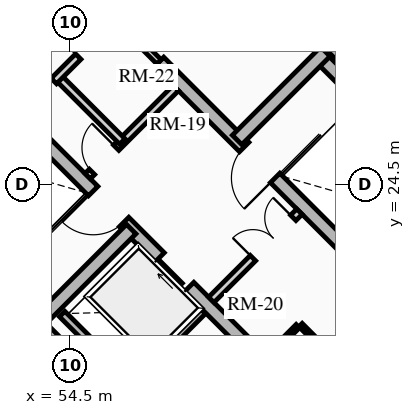
"""IFC4 building model, lengths in metres.
Left out: names, types, materials, properties, quantities, classifications, styles, units other than length and angle.
Written with IfcOpenShell. Run it as: python <this file> out.ifc"""

import sys

from ifc_helpers import new_model, si_unit, direction, frame, frame_2d, origin, place, context, subcontext, project, spatial, rectangle, extrude, source, transform, mapped, element, fill, save


model = new_model("IFC4")
c1 = context("Model", 3, precision=1e-05, world=origin(), true_north=direction((0.0, 1.0)))
c2 = subcontext(c1, "Body", "Model", "MODEL_VIEW")
j1 = project(units=[si_unit("LENGTHUNIT", "METRE"), si_unit("PLANEANGLEUNIT", "RADIAN")], contexts=[c1])
p1 = place(None, origin())
s1 = spatial("IfcSite", under=j1, at=p1, CompositionType="ELEMENT")
p2 = place(p1, origin())
s2 = spatial("IfcBuilding", under=s1, at=p2, CompositionType="ELEMENT")
p3 = place(p2, frame((0.0, 0.0, 240.33)))
s3 = spatial("IfcBuildingStorey", under=s2, at=p3, CompositionType="ELEMENT", Elevation=240.33)
for number, where, z_axis, x_axis in (
    (1, (58.702, 15.732, 0.0), (0.0, 0.0, 1.0), (-0.707, 0.707, 0.0)),
    (2, (66.268, 23.298, 0.0), (0.0, 0.0, 1.0), (-0.707, 0.707, 0.0)),
):
    element("IfcWall", number, at=place(p3, frame(where, z_axis=z_axis, x_axis=x_axis)), inside=s3, PredefinedType="SHEAR", context=c2, shape_type="SweptSolid", body=[
        extrude(rectangle(XDim=14.1, YDim=0.4, at=frame_2d((7.05, 0.0))), origin(), (0.0, 0.0, 1.0), 4.5),
    ])
p4 = place(p3, frame((58.561, 15.873, 0.0), z_axis=(0.0, 0.0, 1.0), x_axis=(0.707106781187, 0.707106781187, 0.0)))
e3 = element("IfcWall", 3, at=p4, inside=s3, PredefinedType="SHEAR", context=c2, shape_type="SweptSolid", body=[
    extrude(rectangle(XDim=10.7, YDim=0.4, at=frame_2d((5.35, 0.0))), origin(), (0.0, 0.0, 1.0), 4.5),
])
m1 = source(origin(), c2, "Body", "SweptSolid", [
    extrude(rectangle(XDim=1.5, YDim=2.02, at=frame_2d((0.75, 1.01))), frame((0.0, 0.21, 0.0), z_axis=(0.0, -1.0, 0.0), x_axis=(1.0, 0.0, 0.0)), (0.0, 0.0, 1.0), 0.42),
])
p5 = place(p4, frame((5.45, 0.0, 0.0)))
e4 = element("IfcOpeningElement", 4, at=p5, cuts=e3, PredefinedType="OPENING", context=c2, shape_type="MappedRepresentation", body=[
    mapped(m1, transform((0.0, 0.0, 0.0), x_axis=(1.0, 0.0, 0.0), y_axis=(0.0, 1.0, 0.0), z_axis=(0.0, 0.0, 1.0), scale=1.0)),
])
p6 = place(p3, frame((48.873, 25.561, 0.0), z_axis=(0.0, 0.0, 1.0), x_axis=(0.707106781187, 0.707106781187, 0.0)))
e5 = element("IfcWall", 5, at=p6, inside=s3, PredefinedType="SHEAR", context=c2, shape_type="SweptSolid", body=[
    extrude(rectangle(XDim=10.7, YDim=0.4, at=frame_2d((5.35, 0.0))), origin(), (0.0, 0.0, 1.0), 4.5),
])
p7 = place(p6, frame((4.6, 0.0, 0.0)))
e6 = element("IfcOpeningElement", 6, at=p7, cuts=e5, PredefinedType="OPENING", context=c2, shape_type="MappedRepresentation", body=[
    mapped(m1, transform((0.0, 0.0, 0.0), x_axis=(1.0, 0.0, 0.0), y_axis=(0.0, 1.0, 0.0), z_axis=(0.0, 0.0, 1.0), scale=1.0)),
])
p8 = place(p3, frame((61.06, 18.373, 0.0), z_axis=(0.0, 0.0, 1.0), x_axis=(-0.707106781187, 0.707106781187, 0.0)))
e7 = element("IfcWall", 7, at=p8, inside=s3, PredefinedType="SHEAR", context=c2, shape_type="SweptSolid", body=[
    extrude(rectangle(XDim=13.7, YDim=0.35, at=frame_2d((6.85, 0.0))), origin(), (0.0, 0.0, 1.0), 4.5),
])
m2 = source(origin(), c2, "Body", "SweptSolid", [
    extrude(rectangle(XDim=1.1, YDim=2.015, at=frame_2d((0.55, 1.007))), frame((0.0, 0.185, 0.0), z_axis=(0.0, -1.0, 0.0), x_axis=(1.0, 0.0, 0.0)), (0.0, 0.0, 1.0), 0.37),
])
p9 = place(p8, frame((4.85, 0.0, 0.0)))
e8 = element("IfcOpeningElement", 8, at=p9, cuts=e7, PredefinedType="OPENING", context=c2, shape_type="MappedRepresentation", body=[
    mapped(m2, transform((0.0, 0.0, 0.0), x_axis=(1.0, 0.0, 0.0), y_axis=(0.0, 1.0, 0.0), z_axis=(0.0, 0.0, 1.0), scale=1.0)),
])
m3 = source(origin(), c2, "Body", "SweptSolid", [
    extrude(rectangle(XDim=1.15, YDim=2.02, at=frame_2d((0.575, 1.01))), frame((0.0, 0.185, 0.0), z_axis=(0.0, -1.0, 0.0), x_axis=(1.0, 0.0, 0.0)), (0.0, 0.0, 1.0), 0.37),
])
p10 = place(p8, frame((7.27, 0.0, 0.0)))
e9 = element("IfcOpeningElement", 9, at=p10, cuts=e7, PredefinedType="OPENING", context=c2, shape_type="MappedRepresentation", body=[
    mapped(m3, transform((0.0, 0.0, 0.0), x_axis=(1.0, 0.0, 0.0), y_axis=(0.0, 1.0, 0.0), z_axis=(0.0, 0.0, 1.0), scale=1.0)),
])
p11 = place(p3, frame((63.627, 20.94, 0.0), z_axis=(0.0, 0.0, 1.0), x_axis=(-0.707119496762, 0.707094065383, 0.0)))
e10 = element("IfcWall", 10, at=p11, inside=s3, PredefinedType="SHEAR", context=c2, shape_type="SweptSolid", body=[
    extrude(rectangle(XDim=9.6, YDim=0.35, at=frame_2d((4.8, 0.0))), origin(), (0.0, 0.0, 1.0), 4.5),
])
p12 = place(p11, frame((5.28, 0.0, 0.0)))
e11 = element("IfcOpeningElement", 11, at=p12, cuts=e10, PredefinedType="OPENING", context=c2, shape_type="MappedRepresentation", body=[
    mapped(m3, transform((0.0, 0.0, 0.0), x_axis=(1.0, 0.0, 0.0), y_axis=(0.0, 1.0, 0.0), z_axis=(0.0, 0.0, 1.0), scale=1.0)),
])
p13 = place(p3, frame((53.922, 21.141, 0.0), z_axis=(0.0, 0.0, 1.0), x_axis=(-0.707106781187, 0.707106781187, 0.0)))
e12 = element("IfcWall", 12, at=p13, inside=s3, PredefinedType="SHEAR", context=c2, shape_type="SweptSolid", body=[
    extrude(rectangle(XDim=6.695, YDim=0.35, at=frame_2d((3.348, 0.0))), origin(), (0.0, 0.0, 1.0), 4.5),
])
p14 = place(p3, frame((53.784, 21.003, 0.0), z_axis=(0.0, 0.0, 1.0), x_axis=(0.707106781187, 0.707106781187, 0.0)))
e13 = element("IfcWall", 13, at=p14, inside=s3, PredefinedType="SHEAR", context=c2, shape_type="SweptSolid", body=[
    extrude(rectangle(XDim=3.285, YDim=0.35, at=frame_2d((1.643, 0.0))), origin(), (0.0, 0.0, 1.0), 4.5),
])
p15 = place(p3, frame((65.812, 23.125, 0.0), z_axis=(0.0, 0.0, 1.0), x_axis=(-0.707106781187, 0.707106781187, 0.0)))
e14 = element("IfcWall", 14, at=p15, inside=s3, PredefinedType="SHEAR", context=c2, shape_type="SweptSolid", body=[
    extrude(rectangle(XDim=6.695, YDim=0.35, at=frame_2d((3.348, 0.0))), origin(), (0.0, 0.0, 1.0), 4.5),
])
p16 = place(p3, frame((58.893, 25.674, 0.0), z_axis=(0.0, 0.0, 1.0), x_axis=(0.707106781187, 0.707106781187, 0.0)))
e15 = element("IfcWall", 15, at=p16, inside=s3, PredefinedType="SHEAR", context=c2, shape_type="SweptSolid", body=[
    extrude(rectangle(XDim=3.285, YDim=0.35, at=frame_2d((1.643, 0.0))), origin(), (0.0, 0.0, 1.0), 4.5),
])
p17 = place(p3, frame((55.888, 19.069, 0.0), z_axis=(0.0, 0.0, 1.0), x_axis=(0.707106781187, 0.707106781187, 0.0)))
e16 = element("IfcWall", 16, at=p17, inside=s3, PredefinedType="SHEAR", context=c2, shape_type="SweptSolid", body=[
    extrude(rectangle(XDim=2.97, YDim=0.2, at=frame_2d((1.485, 0.0))), origin(), (0.0, 0.0, 1.0), 4.5),
])
p18 = place(p3, frame((56.015, 19.366, 0.0), z_axis=(0.0, 0.0, 1.0), x_axis=(-0.707106781187, 0.707106781187, 0.0)))
e17 = element("IfcWall", 17, at=p18, inside=s3, PredefinedType="SHEAR", context=c2, shape_type="SweptSolid", body=[
    extrude(rectangle(XDim=2.44, YDim=0.2, at=frame_2d((1.22, 0.0))), origin(), (0.0, 0.0, 1.0), 4.5),
])
p19 = place(p3, frame((58.214, 21.467, 0.0), z_axis=(0.0, 0.0, 1.0), x_axis=(0.707106781187, 0.707106781187, 0.0)))
e18 = element("IfcWall", 18, at=p19, inside=s3, PredefinedType="PARTITIONING", context=c2, shape_type="SweptSolid", body=[
    extrude(rectangle(XDim=3.28, YDim=0.2, at=frame_2d((1.64, 0.0))), origin(), (0.0, 0.0, 1.0), 4.185),
])
m4 = source(origin(), c2, "Body", "SweptSolid", [
    extrude(rectangle(XDim=1.5, YDim=2.02, at=frame_2d((0.75, 1.01))), frame((0.0, 0.11, 0.0), z_axis=(0.0, -1.0, 0.0), x_axis=(1.0, 0.0, 0.0)), (0.0, 0.0, 1.0), 0.22),
])
p20 = place(p19, frame((1.55, 0.0, 0.0)))
e19 = element("IfcOpeningElement", 19, at=p20, cuts=e18, PredefinedType="OPENING", context=c2, shape_type="MappedRepresentation", body=[
    mapped(m4, transform((0.0, 0.0, 0.0), x_axis=(1.0, 0.0, 0.0), y_axis=(0.0, 1.0, 0.0), z_axis=(0.0, 0.0, 1.0), scale=1.0)),
])
p21 = place(p3, frame((54.961, 24.719, 0.0), z_axis=(0.0, 0.0, 1.0), x_axis=(0.707106781187, 0.707106781187, 0.0)))
e20 = element("IfcWall", 20, at=p21, inside=s3, PredefinedType="PARTITIONING", context=c2, shape_type="SweptSolid", body=[
    extrude(rectangle(XDim=3.28, YDim=0.2, at=frame_2d((1.64, 0.0))), origin(), (0.0, 0.0, 1.0), 4.185),
])
m5 = source(origin(), c2, "Body", "SweptSolid", [
    extrude(rectangle(XDim=0.9, YDim=2.005, at=frame_2d((0.45, 1.002))), frame((0.0, 0.11, 0.0), z_axis=(0.0, -1.0, 0.0), x_axis=(1.0, 0.0, 0.0)), (0.0, 0.0, 1.0), 0.22),
])
p22 = place(p21, frame((0.16, 0.0, 0.0)))
e21 = element("IfcOpeningElement", 21, at=p22, cuts=e20, PredefinedType="OPENING", context=c2, shape_type="MappedRepresentation", body=[
    mapped(m5, transform((0.0, 0.0, 0.0), x_axis=(1.0, 0.0, 0.0), y_axis=(0.0, 1.0, 0.0), z_axis=(0.0, 0.0, 1.0), scale=1.0)),
])
p23 = place(p3, frame((55.874, 25.631, 0.0), z_axis=(0.0, 0.0, 1.0), x_axis=(-0.707157639372, 0.707055919343, 0.0)))
e22 = element("IfcWall", 22, at=p23, inside=s3, PredefinedType="PARTITIONING", context=c2, shape_type="SweptSolid", body=[
    extrude(rectangle(XDim=2.4, YDim=0.2, at=frame_2d((1.2, 0.0))), origin(), (0.0, 0.0, 1.0), 4.185),
])
p24 = place(p3, frame((53.264, 26.416, 0.0), z_axis=(0.0, 0.0, 1.0), x_axis=(0.707106781187, 0.707106781187, 0.0)))
e23 = element("IfcWall", 23, at=p24, inside=s3, PredefinedType="PARTITIONING", context=c2, shape_type="SweptSolid", body=[
    extrude(rectangle(XDim=3.28, YDim=0.2, at=frame_2d((1.64, 0.0))), origin(), (0.0, 0.0, 1.0), 4.185),
])
m6 = source(origin(), c2, "Body", "SweptSolid", [
    extrude(rectangle(XDim=1.0, YDim=2.015, at=frame_2d((0.5, 1.007))), frame((0.0, 0.11, 0.0), z_axis=(0.0, -1.0, 0.0), x_axis=(1.0, 0.0, 0.0)), (0.0, 0.0, 1.0), 0.22),
])
p25 = place(p24, frame((0.14, 0.0, 0.0)))
e24 = element("IfcOpeningElement", 24, at=p25, cuts=e23, PredefinedType="OPENING", context=c2, shape_type="MappedRepresentation", body=[
    mapped(m6, transform((0.0, 0.0, 0.0), x_axis=(1.0, 0.0, 0.0), y_axis=(0.0, 1.0, 0.0), z_axis=(0.0, 0.0, 1.0), scale=1.0)),
])
p26 = place(p24, frame((2.05, 0.0, 0.0)))
e25 = element("IfcOpeningElement", 25, at=p26, cuts=e23, PredefinedType="OPENING", context=c2, shape_type="MappedRepresentation", body=[
    mapped(m5, transform((0.0, 0.0, 0.0), x_axis=(1.0, 0.0, 0.0), y_axis=(0.0, 1.0, 0.0), z_axis=(0.0, 0.0, 1.0), scale=1.0)),
])
p27 = place(p3, frame((61.835, 19.529, 0.0), z_axis=(0.0, 0.0, 1.0), x_axis=(-0.707174592913, 0.707038962956, 0.0)))
e26 = element("IfcWall", 26, at=p27, inside=s3, PredefinedType="PARTITIONING", context=c2, shape_type="SweptSolid", body=[
    extrude(rectangle(XDim=1.8, YDim=0.125, at=frame_2d((0.9, 0.0))), origin(), (0.0, 0.0, 1.0), 4.185),
])
m7 = source(origin(), c2, "Body", "SweptSolid", [
    extrude(rectangle(XDim=0.9, YDim=2.005, at=frame_2d((0.45, 1.002))), frame((0.0, 0.073, 0.0), z_axis=(0.0, -1.0, 0.0), x_axis=(1.0, 0.0, 0.0)), (0.0, 0.0, 1.0), 0.145),
])
p28 = place(p27, frame((0.42, 0.0, 0.0)))
e27 = element("IfcOpeningElement", 27, at=p28, cuts=e26, PredefinedType="OPENING", context=c2, shape_type="MappedRepresentation", body=[
    mapped(m7, transform((0.0, 0.0, 0.0), x_axis=(1.0, 0.0, 0.0), y_axis=(0.0, 1.0, 0.0), z_axis=(0.0, 0.0, 1.0), scale=1.0)),
])
p29 = place(p3, frame((59.713, 19.996, 0.0), z_axis=(0.0, 0.0, 1.0), x_axis=(0.707217726, 0.706995818963, 0.0)))
e28 = element("IfcWall", 28, at=p29, inside=s3, PredefinedType="PARTITIONING", context=c2, shape_type="SweptSolid", body=[
    extrude(rectangle(XDim=1.1, YDim=0.125, at=frame_2d((0.55, 0.0))), origin(), (0.0, 0.0, 1.0), 4.185),
])
p30 = place(p3, frame((56.839, 27.728, 0.0), z_axis=(0.0, 0.0, 1.0), x_axis=(-0.707106781187, 0.707106781187, 0.0)))
e29 = element("IfcWall", 29, at=p30, inside=s3, PredefinedType="PARTITIONING", context=c2, shape_type="SweptSolid", body=[
    extrude(rectangle(XDim=3.9, YDim=0.16, at=frame_2d((1.95, 0.0))), origin(), (0.0, 0.0, 1.0), 4.185),
])
m8 = source(origin(), c2, "Body", "SweptSolid", [
    extrude(rectangle(XDim=0.9, YDim=2.005, at=frame_2d((0.45, 1.002))), frame((0.0, 0.09, 0.0), z_axis=(0.0, -1.0, 0.0), x_axis=(1.0, 0.0, 0.0)), (0.0, 0.0, 1.0), 0.18),
])
p31 = place(p30, frame((2.2, 0.0, 0.0)))
e30 = element("IfcOpeningElement", 30, at=p31, cuts=e29, PredefinedType="OPENING", context=c2, shape_type="MappedRepresentation", body=[
    mapped(m8, transform((0.0, 0.0, 0.0), x_axis=(1.0, 0.0, 0.0), y_axis=(0.0, 1.0, 0.0), z_axis=(0.0, 0.0, 1.0), scale=1.0)),
])
p32 = place(p3, frame((58.419, 13.115, 0.0), z_axis=(0.0, 0.0, 1.0), x_axis=(0.707106781187, 0.707106781187, 0.0)))
e31 = element("IfcWall", 31, at=p32, inside=s3, PredefinedType="PARTITIONING", context=c2, shape_type="SweptSolid", body=[
    extrude(rectangle(XDim=14.8, YDim=0.18, at=frame_2d((7.4, 0.0))), origin(), (0.0, 0.0, 1.0), 3.476),
])
m9 = source(origin(), c2, "Body", "SweptSolid", [
    extrude(rectangle(XDim=1.4, YDim=2.02, at=frame_2d((0.7, 1.01))), frame((0.0, 0.1, 0.0), z_axis=(0.0, -1.0, 0.0), x_axis=(1.0, 0.0, 0.0)), (0.0, 0.0, 1.0), 0.2),
])
p33 = place(p32, frame((6.7, 0.0, 0.0)))
e32 = element("IfcOpeningElement", 32, at=p33, cuts=e31, PredefinedType="OPENING", context=c2, shape_type="MappedRepresentation", body=[
    mapped(m9, transform((0.0, 0.0, 0.0), x_axis=(1.0, 0.0, 0.0), y_axis=(0.0, 1.0, 0.0), z_axis=(0.0, 0.0, 1.0), scale=1.0)),
])
p34 = place(p3, frame((58.419, 13.115, 0.0), z_axis=(0.0, 0.0, 1.0), x_axis=(-0.707106781187, 0.707106781187, 0.0)))
e33 = element("IfcWall", 33, at=p34, inside=s3, PredefinedType="PARTITIONING", context=c2, shape_type="SweptSolid", body=[
    extrude(rectangle(XDim=15.55, YDim=0.18, at=frame_2d((7.775, 0.0))), origin(), (0.0, 0.0, 1.0), 3.476),
])
p35 = place(p34, frame((7.075, 0.0, 0.0)))
e34 = element("IfcOpeningElement", 34, at=p35, cuts=e33, PredefinedType="OPENING", context=c2, shape_type="MappedRepresentation", body=[
    mapped(m9, transform((0.0, 0.0, 0.0), x_axis=(1.0, 0.0, 0.0), y_axis=(0.0, 1.0, 0.0), z_axis=(0.0, 0.0, 1.0), scale=1.0)),
])
p36 = place(p3, frame((68.885, 23.581, 0.0), z_axis=(0.0, 0.0, 1.0), x_axis=(-0.707106781187, 0.707106781187, 0.0)))
e35 = element("IfcWall", 35, at=p36, inside=s3, PredefinedType="PARTITIONING", context=c2, shape_type="SweptSolid", body=[
    extrude(rectangle(XDim=15.55, YDim=0.18, at=frame_2d((7.775, 0.0))), origin(), (0.0, 0.0, 1.0), 3.476),
])
p37 = place(p36, frame((7.075, 0.0, 0.0)))
e36 = element("IfcOpeningElement", 36, at=p37, cuts=e35, PredefinedType="OPENING", context=c2, shape_type="MappedRepresentation", body=[
    mapped(m9, transform((0.0, 0.0, 0.0), x_axis=(1.0, 0.0, 0.0), y_axis=(0.0, 1.0, 0.0), z_axis=(0.0, 0.0, 1.0), scale=1.0)),
])
m10 = source(origin(), c2, "Body", "SweptSolid", [
    extrude(rectangle(XDim=1.1, YDim=2.015, at=frame_2d((0.55, 1.007))), frame((0.0, 0.025, 0.0), z_axis=(0.0, -1.0, 0.0), x_axis=(1.0, 0.0, 0.0)), (0.0, 0.0, 1.0), 0.05),
])
p38 = place(p9, origin())
e37 = element("IfcDoor", 37, at=p38, inside=s3, OperationType="SLIDING_TO_RIGHT", PredefinedType="DOOR", context=c2, shape_type="MappedRepresentation", body=[
    mapped(m10, transform((0.0, 0.0, 0.0), x_axis=(1.0, 0.0, 0.0), y_axis=(0.0, 1.0, 0.0), z_axis=(0.0, 0.0, 1.0), scale=1.0)),
])
fill(e8, e37)
m11 = source(origin(), c2, "Body", "SweptSolid", [
    extrude(rectangle(XDim=1.15, YDim=2.02, at=frame_2d((0.575, 1.01))), frame((0.0, 0.025, 0.0), z_axis=(0.0, -1.0, 0.0), x_axis=(1.0, 0.0, 0.0)), (0.0, 0.0, 1.0), 0.05),
])
p39 = place(p10, origin())
e38 = element("IfcDoor", 38, at=p39, inside=s3, OperationType="SINGLE_SWING_RIGHT", PredefinedType="DOOR", context=c2, shape_type="MappedRepresentation", body=[
    mapped(m11, transform((0.0, 0.0, 0.0), x_axis=(1.0, 0.0, 0.0), y_axis=(0.0, 1.0, 0.0), z_axis=(0.0, 0.0, 1.0), scale=1.0)),
])
fill(e9, e38)
p40 = place(p12, origin())
e39 = element("IfcDoor", 39, at=p40, inside=s3, OperationType="SINGLE_SWING_LEFT", PredefinedType="DOOR", context=c2, shape_type="MappedRepresentation", body=[
    mapped(m11, transform((0.0, 0.0, 0.0), x_axis=(1.0, 0.0, 0.0), y_axis=(0.0, 1.0, 0.0), z_axis=(0.0, 0.0, 1.0), scale=1.0)),
])
fill(e11, e39)
m12 = source(origin(), c2, "Body", "SweptSolid", [
    extrude(rectangle(XDim=1.5, YDim=2.02, at=frame_2d((0.75, 1.01))), frame((0.0, 0.025, 0.0), z_axis=(0.0, -1.0, 0.0), x_axis=(1.0, 0.0, 0.0)), (0.0, 0.0, 1.0), 0.05),
])
p41 = place(p20, origin())
e40 = element("IfcDoor", 40, at=p41, inside=s3, OperationType="DOUBLE_DOOR_SINGLE_SWING", PredefinedType="DOOR", context=c2, shape_type="MappedRepresentation", body=[
    mapped(m12, transform((0.0, 0.0, 0.0), x_axis=(1.0, 0.0, 0.0), y_axis=(0.0, 1.0, 0.0), z_axis=(0.0, 0.0, 1.0), scale=1.0)),
])
fill(e19, e40)
m13 = source(origin(), c2, "Body", "SweptSolid", [
    extrude(rectangle(XDim=0.9, YDim=2.005, at=frame_2d((0.45, 1.002))), frame((0.0, 0.025, 0.0), z_axis=(0.0, -1.0, 0.0), x_axis=(1.0, 0.0, 0.0)), (0.0, 0.0, 1.0), 0.05),
])
p42 = place(p22, origin())
e41 = element("IfcDoor", 41, at=p42, inside=s3, OperationType="SINGLE_SWING_RIGHT", PredefinedType="DOOR", context=c2, shape_type="MappedRepresentation", body=[
    mapped(m13, transform((0.0, 0.0, 0.0), x_axis=(1.0, 0.0, 0.0), y_axis=(0.0, 1.0, 0.0), z_axis=(0.0, 0.0, 1.0), scale=1.0)),
])
fill(e21, e41)
m14 = source(origin(), c2, "Body", "SweptSolid", [
    extrude(rectangle(XDim=1.0, YDim=2.015, at=frame_2d((0.5, 1.007))), frame((0.0, 0.025, 0.0), z_axis=(0.0, -1.0, 0.0), x_axis=(1.0, 0.0, 0.0)), (0.0, 0.0, 1.0), 0.05),
])
p43 = place(p25, origin())
e42 = element("IfcDoor", 42, at=p43, inside=s3, OperationType="SINGLE_SWING_LEFT", PredefinedType="DOOR", context=c2, shape_type="MappedRepresentation", body=[
    mapped(m14, transform((0.0, 0.0, 0.0), x_axis=(1.0, 0.0, 0.0), y_axis=(0.0, 1.0, 0.0), z_axis=(0.0, 0.0, 1.0), scale=1.0)),
])
fill(e24, e42)
p44 = place(p26, origin())
e43 = element("IfcDoor", 43, at=p44, inside=s3, OperationType="SINGLE_SWING_LEFT", PredefinedType="DOOR", context=c2, shape_type="MappedRepresentation", body=[
    mapped(m13, transform((0.0, 0.0, 0.0), x_axis=(1.0, 0.0, 0.0), y_axis=(0.0, 1.0, 0.0), z_axis=(0.0, 0.0, 1.0), scale=1.0)),
])
fill(e25, e43)
save(model, sys.argv[1])
